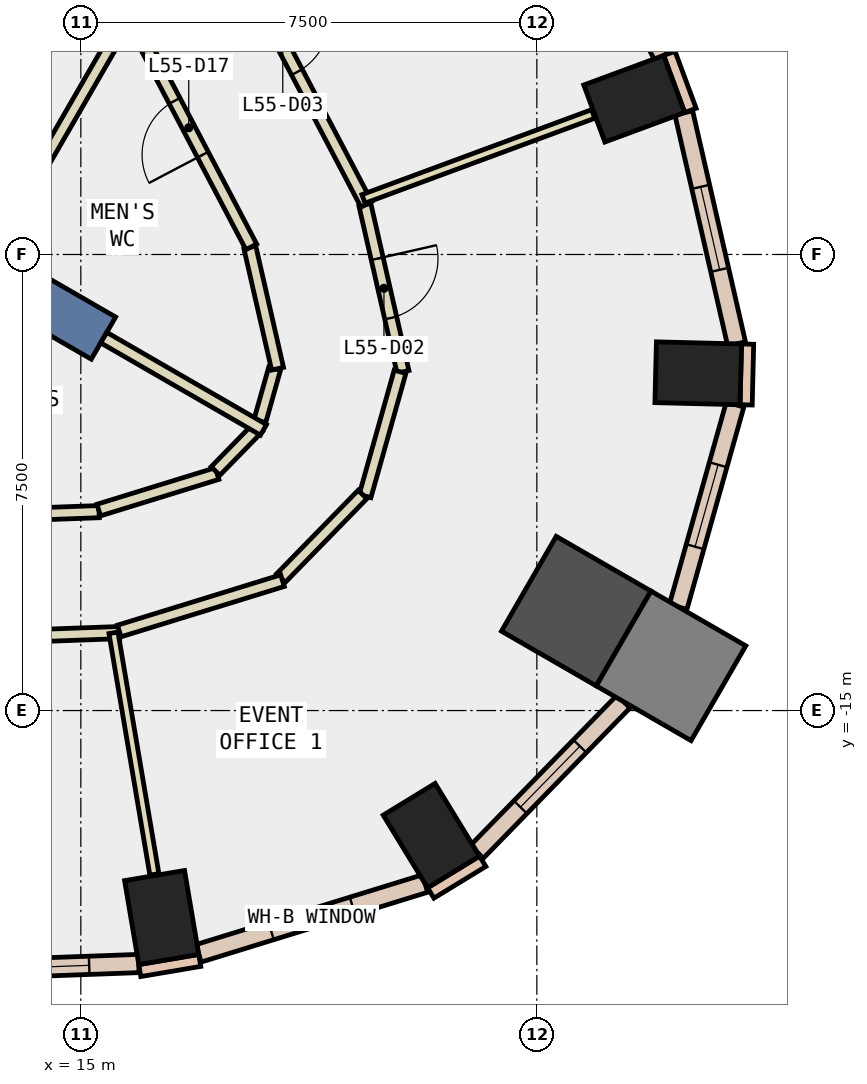
"""IFC4 building model, lengths in metres.
Left out: names, types, materials, properties, quantities, classifications, styles, units other than length and angle.
Written with IfcOpenShell. Run it as: python <this file> out.ifc"""

import sys

from ifc_helpers import new_model, si_unit, direction, frame, frame_2d, origin, origin_2d, place, context, subcontext, project, spatial, rectangle, extrude, element, fill, save


model = new_model("IFC4")
c1 = context("Model", 3, precision=1e-05, world=origin(), true_north=direction((0.0, 1.0)))
c2 = subcontext(c1, "Body", "Model", "MODEL_VIEW")
j1 = project(units=[si_unit("LENGTHUNIT", "METRE"), si_unit("PLANEANGLEUNIT", "RADIAN")], contexts=[c1])
p1 = place(None, origin())
s1 = spatial("IfcSite", under=j1, at=p1, CompositionType="ELEMENT")
p2 = place(p1, origin())
s2 = spatial("IfcBuilding", under=s1, at=p2, CompositionType="ELEMENT")
p3 = place(p2, frame((0.0, 0.0, 245.0)))
s3 = spatial("IfcBuildingStorey", under=s2, at=p3, CompositionType="ELEMENT", Elevation=245.0)
for number, where, z_axis, x_axis in (
    (1, (16.33, -18.404, -0.34), (0.0, 0.0, 1.0), (0.986, 0.167, 0.0)),
    (2, (20.765, -17.057, -0.34), (0.0, 0.0, 1.0), (0.853, 0.521, 0.0)),
):
    element("IfcColumn", number, at=place(p3, frame(where, z_axis=z_axis, x_axis=x_axis)), inside=s3, PredefinedType="COLUMN", context=c2, shape_type="SweptSolid", body=[
        extrude(rectangle(XDim=1.0, YDim=1.4, at=origin_2d()), origin(), (0.0, 0.0, 1.0), 3.6),
    ])
p4 = place(p3, frame((23.148, -13.365, -0.34), z_axis=(0.0, 0.0, 1.0), x_axis=(-0.866025403784, 0.5, 0.0)))
e3 = element("IfcColumn", 3, at=p4, inside=s3, PredefinedType="COLUMN", context=c2, shape_type="SweptSolid", body=[
    extrude(rectangle(XDim=1.8, YDim=1.8, at=origin_2d()), origin(), (0.0, 0.0, 1.0), 3.6),
])
for number, where, z_axis, x_axis in (
    (4, (25.154, -9.454, -0.34), (0.0, 0.0, 1.0), (0.025, 1.0, 0.0)),
    (5, (24.102, -4.939, -0.34), (0.0, 0.0, 1.0), (-0.347, 0.938, 0.0)),
):
    element("IfcColumn", number, at=place(p3, frame(where, z_axis=z_axis, x_axis=x_axis)), inside=s3, PredefinedType="COLUMN", context=c2, shape_type="SweptSolid", body=[
        extrude(rectangle(XDim=1.0, YDim=1.4, at=origin_2d()), origin(), (0.0, 0.0, 1.0), 3.6),
    ])
p5 = place(p3, frame((24.707, -14.265, -0.34), z_axis=(0.0, 0.0, 1.0), x_axis=(-0.866025403784, 0.5, 0.0)))
e6 = element("IfcColumn", 6, at=p5, inside=s3, PredefinedType="COLUMN", context=c2, shape_type="SweptSolid", body=[
    extrude(rectangle(XDim=1.8, YDim=1.8, at=origin_2d()), origin(), (0.0, 0.0, 1.0), 3.6),
])
p6 = place(p3, frame((7.578, -4.375, -0.34), z_axis=(0.0, 0.0, 1.0), x_axis=(0.866024315419, -0.5000018851, 0.0)))
e7 = element("IfcWall", 7, at=p6, inside=s3, PredefinedType="SHEAR", context=c2, shape_type="SweptSolid", body=[
    extrude(rectangle(XDim=9.0, YDim=0.8, at=frame_2d((4.5, 0.0))), origin(), (0.0, 0.0, 1.0), 3.6),
])
p7 = place(p3, frame((25.026, -5.131, 0.0), z_axis=(0.0, 0.0, 1.0), x_axis=(-0.346892928577, 0.937904737222, 0.0)))
e8 = element("IfcWall", 8, at=p7, inside=s3, PredefinedType="STANDARD", context=c2, shape_type="SweptSolid", body=[
    extrude(rectangle(XDim=1.0, YDim=0.2, at=frame_2d((0.5, 0.0))), origin(), (0.0, 0.0, 1.0), 3.26),
])
p8 = place(p3, frame((15.97, -19.276, 0.0), z_axis=(0.0, 0.0, 1.0), x_axis=(0.985961725342, 0.166971483074, 0.0)))
e9 = element("IfcWall", 9, at=p8, inside=s3, PredefinedType="STANDARD", context=c2, shape_type="SweptSolid", body=[
    extrude(rectangle(XDim=1.0, YDim=0.2, at=frame_2d((0.5, 0.0))), origin(), (0.0, 0.0, 1.0), 3.26),
])
p9 = place(p3, frame((20.755, -18.0, 0.0), z_axis=(0.0, 0.0, 1.0), x_axis=(0.853679739553, 0.520798331677, 0.0)))
e10 = element("IfcWall", 10, at=p9, inside=s3, PredefinedType="STANDARD", context=c2, shape_type="SweptSolid", body=[
    extrude(rectangle(XDim=1.0, YDim=0.2, at=frame_2d((0.5, 0.0))), origin(), (0.0, 0.0, 1.0), 3.26),
])
p10 = place(p3, frame((25.942, -9.973, 0.0), z_axis=(0.0, 0.0, 1.0), x_axis=(0.024192379573, 0.999707321555, 0.0)))
e11 = element("IfcWall", 11, at=p10, inside=s3, PredefinedType="STANDARD", context=c2, shape_type="SweptSolid", body=[
    extrude(rectangle(XDim=0.999, YDim=0.2, at=frame_2d((0.5, 0.0))), origin(), (0.0, 0.0, 1.0), 3.26),
])
p11 = place(p3, frame((8.296, -19.44, 0.0), z_axis=(0.0, 0.0, 1.0), x_axis=(0.999331753125, 0.036551979363, 0.0)))
e12 = element("IfcWall", 12, at=p11, inside=s3, PredefinedType="STANDARD", context=c2, shape_type="SweptSolid", body=[
    extrude(rectangle(XDim=7.661, YDim=0.3, at=frame_2d((3.831, 0.0))), origin(), (0.0, 0.0, 1.0), 3.26),
])
p12 = place(p11, frame((0.815, 0.0, 0.9)))
e13 = element("IfcOpeningElement", 13, at=p12, cuts=e12, PredefinedType="OPENING", context=c2, shape_type="SweptSolid", body=[
    extrude(rectangle(XDim=2.2, YDim=2.0, at=frame_2d((1.1, 1.0))), frame((0.0, 0.16, 0.0), z_axis=(0.0, -1.0, 0.0), x_axis=(1.0, 0.0, 0.0)), (0.0, 0.0, 1.0), 0.32),
])
p13 = place(p11, frame((4.646, 0.0, 0.9)))
e14 = element("IfcOpeningElement", 14, at=p13, cuts=e12, PredefinedType="OPENING", context=c2, shape_type="SweptSolid", body=[
    extrude(rectangle(XDim=2.2, YDim=2.0, at=frame_2d((1.1, 1.0))), frame((0.0, 0.16, 0.0), z_axis=(0.0, -1.0, 0.0), x_axis=(1.0, 0.0, 0.0)), (0.0, 0.0, 1.0), 0.32),
])
p14 = place(p3, frame((16.936, -18.993, 0.0), z_axis=(0.0, 0.0, 1.0), x_axis=(0.955646189569, 0.2945171648, 0.0)))
e15 = element("IfcWall", 15, at=p14, inside=s3, PredefinedType="STANDARD", context=c2, shape_type="SweptSolid", body=[
    extrude(rectangle(XDim=3.898, YDim=0.3, at=frame_2d((1.949, 0.0))), origin(), (0.0, 0.0, 1.0), 3.26),
])
p15 = place(p14, frame((1.249, 0.0, 0.9)))
e16 = element("IfcOpeningElement", 16, at=p15, cuts=e15, PredefinedType="OPENING", context=c2, shape_type="SweptSolid", body=[
    extrude(rectangle(XDim=1.4, YDim=2.0, at=frame_2d((0.7, 1.0))), frame((0.0, 0.16, 0.0), z_axis=(0.0, -1.0, 0.0), x_axis=(1.0, 0.0, 0.0)), (0.0, 0.0, 1.0), 0.32),
])
p16 = place(p3, frame((21.513, -17.324, 0.0), z_axis=(0.0, 0.0, 1.0), x_axis=(0.698394514831, 0.715713002294, 0.0)))
e17 = element("IfcWall", 17, at=p16, inside=s3, PredefinedType="STANDARD", context=c2, shape_type="SweptSolid", body=[
    extrude(rectangle(XDim=3.454, YDim=0.3, at=frame_2d((1.727, 0.0))), origin(), (0.0, 0.0, 1.0), 3.26),
])
p17 = place(p16, frame((1.027, 0.0, 0.9)))
e18 = element("IfcOpeningElement", 18, at=p17, cuts=e17, PredefinedType="OPENING", context=c2, shape_type="SweptSolid", body=[
    extrude(rectangle(XDim=1.4, YDim=2.0, at=frame_2d((0.7, 1.0))), frame((0.0, 0.16, 0.0), z_axis=(0.0, -1.0, 0.0), x_axis=(1.0, 0.0, 0.0)), (0.0, 0.0, 1.0), 0.32),
])
p18 = place(p3, frame((24.824, -13.295, 0.0), z_axis=(0.0, 0.0, 1.0), x_axis=(0.270837632743, 0.962625044703, 0.0)))
e19 = element("IfcWall", 19, at=p18, inside=s3, PredefinedType="STANDARD", context=c2, shape_type="SweptSolid", body=[
    extrude(rectangle(XDim=3.456, YDim=0.3, at=frame_2d((1.728, 0.0))), origin(), (0.0, 0.0, 1.0), 3.26),
])
p19 = place(p18, frame((1.028, 0.0, 0.9)))
e20 = element("IfcOpeningElement", 20, at=p19, cuts=e19, PredefinedType="OPENING", context=c2, shape_type="SweptSolid", body=[
    extrude(rectangle(XDim=1.4, YDim=2.0, at=frame_2d((0.7, 1.0))), frame((0.0, 0.16, 0.0), z_axis=(0.0, -1.0, 0.0), x_axis=(1.0, 0.0, 0.0)), (0.0, 0.0, 1.0), 0.32),
])
p20 = place(p3, frame((25.785, -8.97, 0.0), z_axis=(0.0, 0.0, 1.0), x_axis=(-0.222901327396, 0.974841011778, 0.0)))
e21 = element("IfcWall", 21, at=p20, inside=s3, PredefinedType="STANDARD", context=c2, shape_type="SweptSolid", body=[
    extrude(rectangle(XDim=3.898, YDim=0.3, at=frame_2d((1.949, 0.0))), origin(), (0.0, 0.0, 1.0), 3.26),
])
p21 = place(p20, frame((1.249, 0.0, 0.9)))
e22 = element("IfcOpeningElement", 22, at=p21, cuts=e21, PredefinedType="OPENING", context=c2, shape_type="SweptSolid", body=[
    extrude(rectangle(XDim=1.4, YDim=2.0, at=frame_2d((0.7, 1.0))), frame((0.0, 0.16, 0.0), z_axis=(0.0, -1.0, 0.0), x_axis=(1.0, 0.0, 0.0)), (0.0, 0.0, 1.0), 0.32),
])
p22 = place(p3, frame((24.57, -4.234, 0.0), z_axis=(0.0, 0.0, 1.0), x_axis=(-0.465228032148, 0.885190871001, 0.0)))
e23 = element("IfcWall", 23, at=p22, inside=s3, PredefinedType="STANDARD", context=c2, shape_type="SweptSolid", body=[
    extrude(rectangle(XDim=5.572, YDim=0.3, at=frame_2d((2.786, 0.0))), origin(), (0.0, 0.0, 1.0), 3.26),
])
p23 = place(p22, frame((0.693, 0.0, 0.9)))
e24 = element("IfcOpeningElement", 24, at=p23, cuts=e23, PredefinedType="OPENING", context=c2, shape_type="SweptSolid", body=[
    extrude(rectangle(XDim=1.4, YDim=2.0, at=frame_2d((0.7, 1.0))), frame((0.0, 0.16, 0.0), z_axis=(0.0, -1.0, 0.0), x_axis=(1.0, 0.0, 0.0)), (0.0, 0.0, 1.0), 0.32),
])
p24 = place(p22, frame((3.479, 0.0, 0.9)))
e25 = element("IfcOpeningElement", 25, at=p24, cuts=e23, PredefinedType="OPENING", context=c2, shape_type="SweptSolid", body=[
    extrude(rectangle(XDim=1.4, YDim=2.0, at=frame_2d((0.7, 1.0))), frame((0.0, 0.16, 0.0), z_axis=(0.0, -1.0, 0.0), x_axis=(1.0, 0.0, 0.0)), (0.0, 0.0, 1.0), 0.32),
])
p25 = place(p3, frame((11.077, -11.883, 0.0), z_axis=(0.0, 0.0, 1.0), x_axis=(0.999335333519, 0.036453959732, 0.0)))
e26 = element("IfcWall", 26, at=p25, inside=s3, PredefinedType="PARTITIONING", context=c2, shape_type="SweptSolid", body=[
    extrude(rectangle(XDim=4.226, YDim=0.2, at=frame_2d((2.113, 0.0))), origin(), (0.0, 0.0, 1.0), 3.26),
])
p26 = place(p25, frame((1.613, 0.0, 0.0)))
e27 = element("IfcOpeningElement", 27, at=p26, cuts=e26, PredefinedType="OPENING", context=c2, shape_type="SweptSolid", body=[
    extrude(rectangle(XDim=1.0, YDim=2.1, at=frame_2d((0.5, 1.05))), frame((0.0, 0.11, 0.0), z_axis=(0.0, -1.0, 0.0), x_axis=(1.0, 0.0, 0.0)), (0.0, 0.0, 1.0), 0.22),
])
p27 = place(p3, frame((15.295, -11.703, 0.0), z_axis=(0.0, 0.0, 1.0), x_axis=(0.95563113363, 0.294566013716, 0.0)))
e28 = element("IfcWall", 28, at=p27, inside=s3, PredefinedType="PARTITIONING", context=c2, shape_type="SweptSolid", body=[
    extrude(rectangle(XDim=2.036, YDim=0.2, at=frame_2d((1.018, 0.0))), origin(), (0.0, 0.0, 1.0), 3.26),
])
p28 = place(p3, frame((17.215, -11.061, 0.0), z_axis=(0.0, 0.0, 1.0), x_axis=(0.698527813511, 0.715582904877, 0.0)))
e29 = element("IfcWall", 29, at=p28, inside=s3, PredefinedType="PARTITIONING", context=c2, shape_type="SweptSolid", body=[
    extrude(rectangle(XDim=1.002, YDim=0.2, at=frame_2d((0.501, 0.0))), origin(), (0.0, 0.0, 1.0), 3.26),
])
p29 = place(p3, frame((17.945, -10.238, 0.0), z_axis=(0.0, 0.0, 1.0), x_axis=(0.270785141481, 0.962639811743, 0.0)))
e30 = element("IfcWall", 30, at=p29, inside=s3, PredefinedType="PARTITIONING", context=c2, shape_type="SweptSolid", body=[
    extrude(rectangle(XDim=0.894, YDim=0.2, at=frame_2d((0.447, 0.0))), origin(), (0.0, 0.0, 1.0), 3.26),
])
p30 = place(p3, frame((18.236, -9.379, 0.0), z_axis=(0.0, 0.0, 1.0), x_axis=(-0.222760041204, 0.974873306662, 0.0)))
e31 = element("IfcWall", 31, at=p30, inside=s3, PredefinedType="PARTITIONING", context=c2, shape_type="SweptSolid", body=[
    extrude(rectangle(XDim=2.047, YDim=0.2, at=frame_2d((1.024, 0.0))), origin(), (0.0, 0.0, 1.0), 3.26),
])
p31 = place(p3, frame((17.804, -7.374, 0.0), z_axis=(0.0, 0.0, 1.0), x_axis=(-0.465179971699, 0.885216128372, 0.0)))
e32 = element("IfcWall", 32, at=p31, inside=s3, PredefinedType="PARTITIONING", context=c2, shape_type="SweptSolid", body=[
    extrude(rectangle(XDim=4.424, YDim=0.2, at=frame_2d((2.212, 0.0))), origin(), (0.0, 0.0, 1.0), 3.26),
])
p32 = place(p31, frame((1.712, 0.0, 0.0)))
e33 = element("IfcOpeningElement", 33, at=p32, cuts=e32, PredefinedType="OPENING", context=c2, shape_type="SweptSolid", body=[
    extrude(rectangle(XDim=1.0, YDim=2.1, at=frame_2d((0.5, 1.05))), frame((0.0, 0.11, 0.0), z_axis=(0.0, -1.0, 0.0), x_axis=(1.0, 0.0, 0.0)), (0.0, 0.0, 1.0), 0.22),
])
p33 = place(p3, frame((15.636, -13.718, 0.0), z_axis=(0.0, 0.0, 1.0), x_axis=(-0.99933282306, -0.036522715615, 0.0)))
e34 = element("IfcWall", 34, at=p33, inside=s3, PredefinedType="PARTITIONING", context=c2, shape_type="SweptSolid", body=[
    extrude(rectangle(XDim=7.941, YDim=0.2, at=frame_2d((3.971, 0.0))), origin(), (0.0, 0.0, 1.0), 3.26),
])
p34 = place(p33, frame((3.471, 0.0, 0.0)))
e35 = element("IfcOpeningElement", 35, at=p34, cuts=e34, PredefinedType="OPENING", context=c2, shape_type="SweptSolid", body=[
    extrude(rectangle(XDim=1.0, YDim=2.1, at=frame_2d((0.5, 1.05))), frame((0.0, 0.11, 0.0), z_axis=(0.0, -1.0, 0.0), x_axis=(1.0, 0.0, 0.0)), (0.0, 0.0, 1.0), 0.22),
])
p35 = place(p3, frame((19.672, -6.683, 0.0), z_axis=(0.0, 0.0, 1.0), x_axis=(0.222523624687, -0.974927298036, 0.0)))
e36 = element("IfcWall", 36, at=p35, inside=s3, PredefinedType="PARTITIONING", context=c2, shape_type="SweptSolid", body=[
    extrude(rectangle(XDim=2.817, YDim=0.2, at=frame_2d((1.409, 0.0))), origin(), (0.0, 0.0, 1.0), 3.26),
])
p36 = place(p35, frame((0.909, 0.0, 0.0)))
e37 = element("IfcOpeningElement", 37, at=p36, cuts=e36, PredefinedType="OPENING", context=c2, shape_type="SweptSolid", body=[
    extrude(rectangle(XDim=1.0, YDim=2.1, at=frame_2d((0.5, 1.05))), frame((0.0, 0.11, 0.0), z_axis=(0.0, -1.0, 0.0), x_axis=(1.0, 0.0, 0.0)), (0.0, 0.0, 1.0), 0.22),
])
p37 = place(p3, frame((20.25, -9.429, 0.0), z_axis=(0.0, 0.0, 1.0), x_axis=(-0.270905475888, -0.962605954238, 0.0)))
e38 = element("IfcWall", 38, at=p37, inside=s3, PredefinedType="PARTITIONING", context=c2, shape_type="SweptSolid", body=[
    extrude(rectangle(XDim=2.122, YDim=0.2, at=frame_2d((1.061, 0.0))), origin(), (0.0, 0.0, 1.0), 3.26),
])
p38 = place(p3, frame((19.633, -11.447, 0.0), z_axis=(0.0, 0.0, 1.0), x_axis=(-0.698477855606, -0.715631668687, 0.0)))
e39 = element("IfcWall", 39, at=p38, inside=s3, PredefinedType="PARTITIONING", context=c2, shape_type="SweptSolid", body=[
    extrude(rectangle(XDim=1.921, YDim=0.2, at=frame_2d((0.961, 0.0))), origin(), (0.0, 0.0, 1.0), 3.26),
])
p39 = place(p3, frame((18.317, -12.864, 0.0), z_axis=(0.0, 0.0, 1.0), x_axis=(-0.955600342663, -0.294665887239, 0.0)))
e40 = element("IfcWall", 40, at=p39, inside=s3, PredefinedType="PARTITIONING", context=c2, shape_type="SweptSolid", body=[
    extrude(rectangle(XDim=2.81, YDim=0.2, at=frame_2d((1.405, 0.0))), origin(), (0.0, 0.0, 1.0), 3.26),
])
p40 = place(p3, frame((16.947, -1.443, 0.0), z_axis=(0.0, 0.0, 1.0), x_axis=(0.465133414481, -0.88524059257, 0.0)))
e41 = element("IfcWall", 41, at=p40, inside=s3, PredefinedType="PARTITIONING", context=c2, shape_type="SweptSolid", body=[
    extrude(rectangle(XDim=5.91, YDim=0.2, at=frame_2d((2.955, 0.0))), origin(), (0.0, 0.0, 1.0), 3.26),
])
p41 = place(p40, frame((2.455, 0.0, 0.0)))
e42 = element("IfcOpeningElement", 42, at=p41, cuts=e41, PredefinedType="OPENING", context=c2, shape_type="SweptSolid", body=[
    extrude(rectangle(XDim=1.0, YDim=2.1, at=frame_2d((0.5, 1.05))), frame((0.0, 0.11, 0.0), z_axis=(0.0, -1.0, 0.0), x_axis=(1.0, 0.0, 0.0)), (0.0, 0.0, 1.0), 0.22),
])
p42 = place(p3, frame((15.793, -3.546, 0.0), z_axis=(0.0, 0.0, 1.0), x_axis=(-0.500000064182, -0.866025366729, 0.0)))
e43 = element("IfcWall", 43, at=p42, inside=s3, PredefinedType="PARTITIONING", context=c2, shape_type="SweptSolid", body=[
    extrude(rectangle(XDim=4.06, YDim=0.2, at=frame_2d((2.03, 0.0))), origin(), (0.0, 0.0, 1.0), 3.26),
])
p43 = place(p3, frame((15.377, -8.867, 0.0), z_axis=(0.0, 0.0, 1.0), x_axis=(0.865965767548, -0.500103278768, 0.0)))
e44 = element("IfcWall", 44, at=p43, inside=s3, PredefinedType="PARTITIONING", context=c2, shape_type="SweptSolid", body=[
    extrude(rectangle(XDim=3.033, YDim=0.2, at=frame_2d((1.517, 0.0))), origin(), (0.0, 0.0, 1.0), 3.26),
])
p44 = place(p3, frame((15.537, -13.722, 0.0), z_axis=(0.0, 0.0, 1.0), x_axis=(0.167012380144, -0.985954798598, 0.0)))
e45 = element("IfcWall", 45, at=p44, inside=s3, PredefinedType="PARTITIONING", context=c2, shape_type="SweptSolid", body=[
    extrude(rectangle(XDim=4.029, YDim=0.15, at=frame_2d((2.014, 0.0))), origin(), (0.0, 0.0, 1.0), 3.26),
])
p45 = place(p3, frame((19.649, -6.586, 0.0), z_axis=(0.0, 0.0, 1.0), x_axis=(0.937935790958, 0.346808956114, 0.0)))
e46 = element("IfcWall", 46, at=p45, inside=s3, PredefinedType="PARTITIONING", context=c2, shape_type="SweptSolid", body=[
    extrude(rectangle(XDim=4.028, YDim=0.15, at=frame_2d((2.014, 0.0))), origin(), (0.0, 0.0, 1.0), 3.26),
])
p46 = place(p13, origin())
e47 = element("IfcWindow", 47, at=p46, inside=s3, PartitioningType="SINGLE_PANEL", PredefinedType="WINDOW", context=c2, shape_type="SweptSolid", body=[
    extrude(rectangle(XDim=2.2, YDim=2.0, at=frame_2d((1.1, 1.0))), frame((0.0, 0.03, 0.0), z_axis=(0.0, -1.0, 0.0), x_axis=(1.0, 0.0, 0.0)), (0.0, 0.0, 1.0), 0.06),
])
fill(e14, e47)
p47 = place(p15, origin())
e48 = element("IfcWindow", 48, at=p47, inside=s3, PartitioningType="SINGLE_PANEL", PredefinedType="WINDOW", context=c2, shape_type="SweptSolid", body=[
    extrude(rectangle(XDim=1.4, YDim=2.0, at=frame_2d((0.7, 1.0))), frame((0.0, 0.03, 0.0), z_axis=(0.0, -1.0, 0.0), x_axis=(1.0, 0.0, 0.0)), (0.0, 0.0, 1.0), 0.06),
])
fill(e16, e48)
p48 = place(p17, origin())
e49 = element("IfcWindow", 49, at=p48, inside=s3, PartitioningType="SINGLE_PANEL", PredefinedType="WINDOW", context=c2, shape_type="SweptSolid", body=[
    extrude(rectangle(XDim=1.4, YDim=2.0, at=frame_2d((0.7, 1.0))), frame((0.0, 0.03, 0.0), z_axis=(0.0, -1.0, 0.0), x_axis=(1.0, 0.0, 0.0)), (0.0, 0.0, 1.0), 0.06),
])
fill(e18, e49)
p49 = place(p19, origin())
e50 = element("IfcWindow", 50, at=p49, inside=s3, PartitioningType="SINGLE_PANEL", PredefinedType="WINDOW", context=c2, shape_type="SweptSolid", body=[
    extrude(rectangle(XDim=1.4, YDim=2.0, at=frame_2d((0.7, 1.0))), frame((0.0, 0.03, 0.0), z_axis=(0.0, -1.0, 0.0), x_axis=(1.0, 0.0, 0.0)), (0.0, 0.0, 1.0), 0.06),
])
fill(e20, e50)
p50 = place(p21, origin())
e51 = element("IfcWindow", 51, at=p50, inside=s3, PartitioningType="SINGLE_PANEL", PredefinedType="WINDOW", context=c2, shape_type="SweptSolid", body=[
    extrude(rectangle(XDim=1.4, YDim=2.0, at=frame_2d((0.7, 1.0))), frame((0.0, 0.03, 0.0), z_axis=(0.0, -1.0, 0.0), x_axis=(1.0, 0.0, 0.0)), (0.0, 0.0, 1.0), 0.06),
])
fill(e22, e51)
p51 = place(p36, origin())
e52 = element("IfcDoor", 52, at=p51, inside=s3, OperationType="SINGLE_SWING_LEFT", PredefinedType="DOOR", context=c2, shape_type="SweptSolid", body=[
    extrude(rectangle(XDim=1.0, YDim=2.1, at=frame_2d((0.5, 1.05))), frame((0.0, 0.025, 0.0), z_axis=(0.0, -1.0, 0.0), x_axis=(1.0, 0.0, 0.0)), (0.0, 0.0, 1.0), 0.05),
])
fill(e37, e52)
p52 = place(p41, origin())
e53 = element("IfcDoor", 53, at=p52, inside=s3, OperationType="SINGLE_SWING_LEFT", PredefinedType="DOOR", context=c2, shape_type="SweptSolid", body=[
    extrude(rectangle(XDim=1.0, YDim=2.1, at=frame_2d((0.5, 1.05))), frame((0.0, 0.025, 0.0), z_axis=(0.0, -1.0, 0.0), x_axis=(1.0, 0.0, 0.0)), (0.0, 0.0, 1.0), 0.05),
])
fill(e42, e53)
p53 = place(p32, origin())
e54 = element("IfcDoor", 54, at=p53, inside=s3, OperationType="SINGLE_SWING_LEFT", PredefinedType="DOOR", context=c2, shape_type="SweptSolid", body=[
    extrude(rectangle(XDim=1.0, YDim=2.1, at=frame_2d((0.5, 1.05))), frame((0.0, 0.025, 0.0), z_axis=(0.0, -1.0, 0.0), x_axis=(1.0, 0.0, 0.0)), (0.0, 0.0, 1.0), 0.05),
])
fill(e33, e54)
save(model, sys.argv[1])
